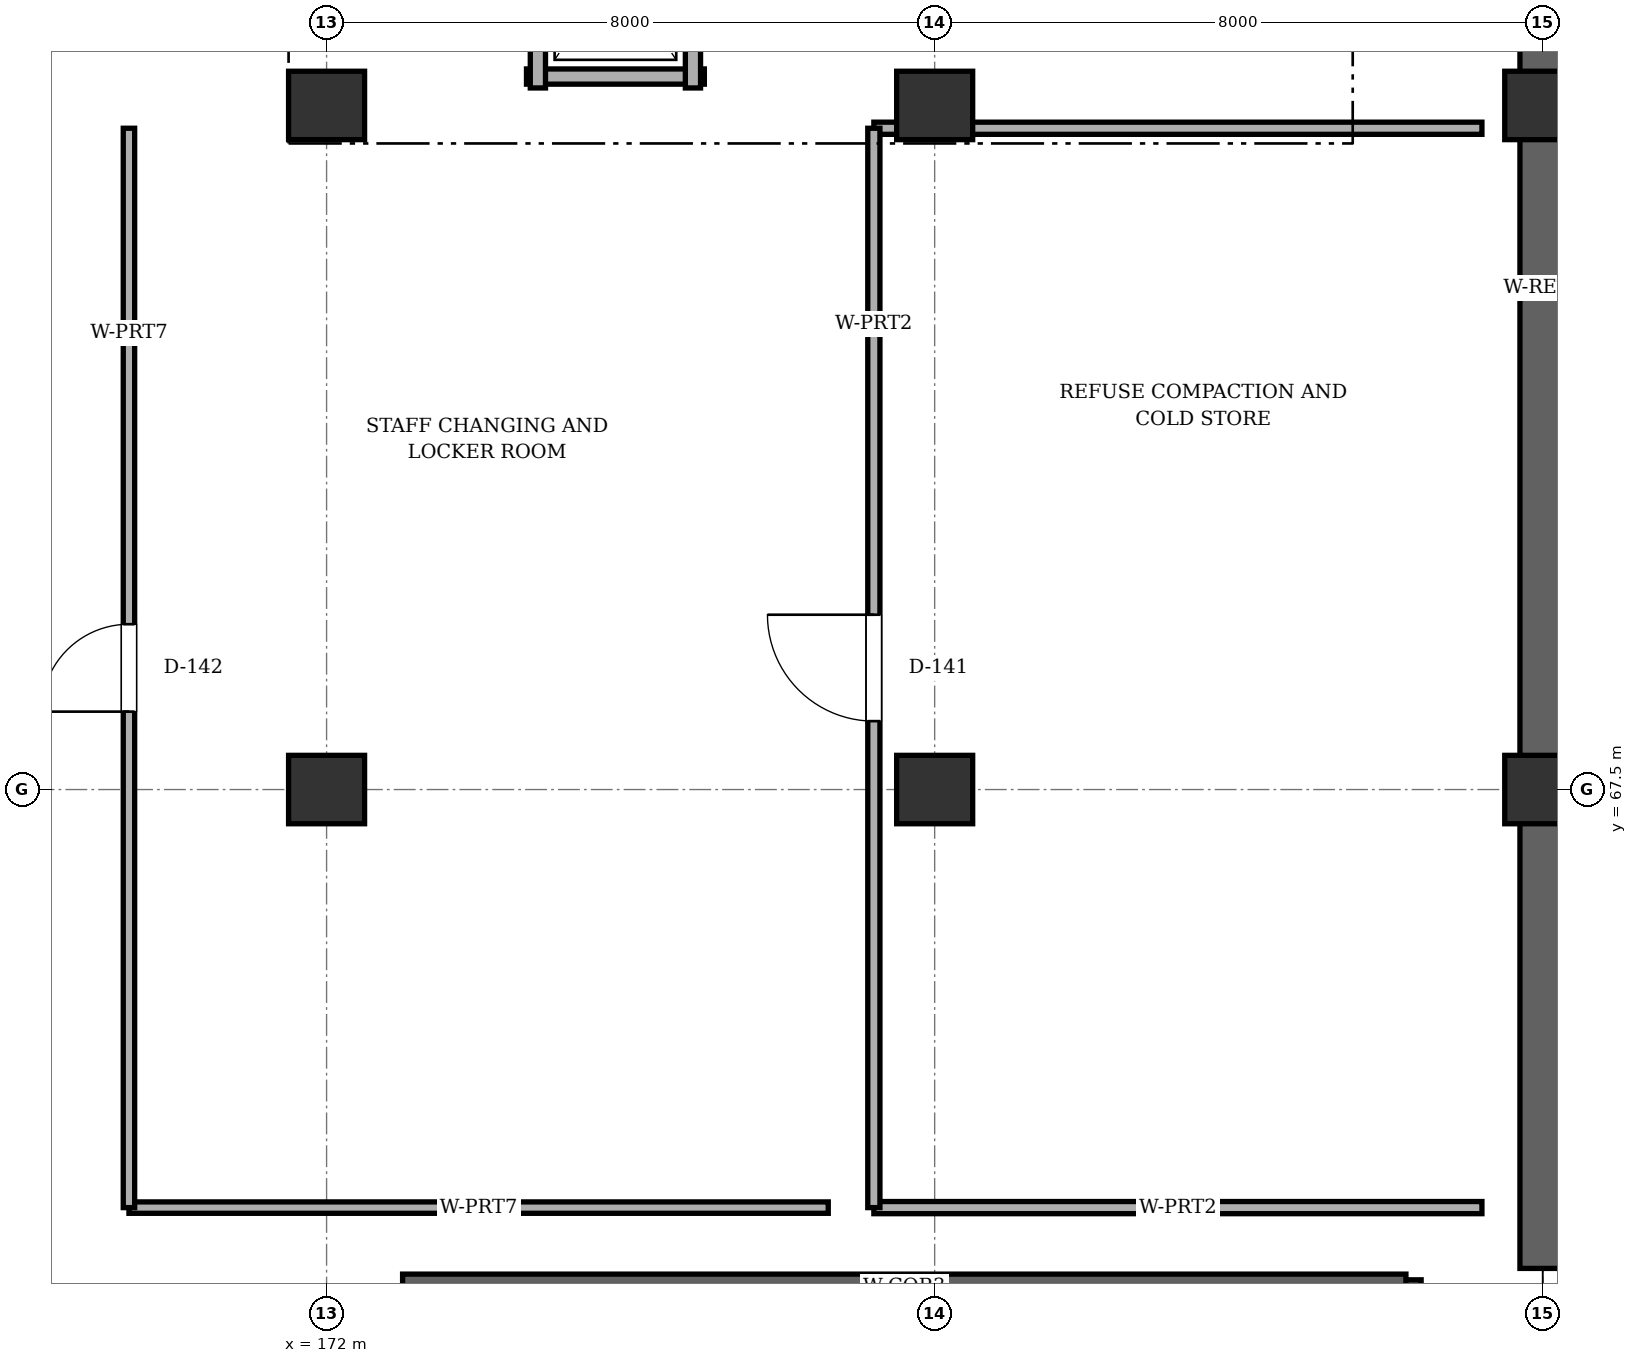
"""IFC4 building model, lengths in metres.
Left out: names, types, materials, properties, quantities, classifications, styles, units other than length and angle.
Written with IfcOpenShell. Run it as: python <this file> out.ifc"""

import sys

from ifc_helpers import new_model, si_unit, direction, frame, frame_2d, origin, origin_2d, place, context, subcontext, project, spatial, rectangle, extrude, element, fill, save


model = new_model("IFC4")
c1 = context("Model", 3, precision=1e-05, world=origin(), true_north=direction((0.0, 1.0)))
c2 = subcontext(c1, "Body", "Model", "MODEL_VIEW")
j1 = project(units=[si_unit("LENGTHUNIT", "METRE"), si_unit("PLANEANGLEUNIT", "RADIAN")], contexts=[c1])
p1 = place(None, origin())
s1 = spatial("IfcSite", under=j1, at=p1, CompositionType="ELEMENT")
p2 = place(p1, origin())
s2 = spatial("IfcBuilding", under=s1, at=p2, CompositionType="ELEMENT")
p3 = place(p2, frame((0.0, 0.0, -5.4)))
s3 = spatial("IfcBuildingStorey", under=s2, at=p3, CompositionType="ELEMENT", Elevation=-5.4)
for number, where, z_axis, x_axis in (
    (1, (172.0, 67.5, 0.0), (0.0, 0.0, 1.0), (1.0, 0.0, 0.0)),
    (2, (172.0, 76.5, 0.0), (0.0, 0.0, 1.0), (1.0, 0.0, 0.0)),
    (3, (180.0, 67.5, 0.0), (0.0, 0.0, 1.0), (1.0, 0.0, 0.0)),
    (4, (180.0, 76.5, 0.0), (0.0, 0.0, 1.0), (1.0, 0.0, 0.0)),
    (5, (188.0, 67.5, 0.0), (0.0, 0.0, 1.0), (1.0, 0.0, 0.0)),
    (6, (188.0, 76.5, 0.0), (0.0, 0.0, 1.0), (1.0, 0.0, 0.0)),
):
    element("IfcColumn", number, at=place(p3, frame(where, z_axis=z_axis, x_axis=x_axis)), inside=s3, PredefinedType="COLUMN", context=c2, shape_type="SweptSolid", body=[
        extrude(rectangle(XDim=1.0, YDim=0.9, at=origin_2d()), origin(), (0.0, 0.0, 1.0), 5.4),
    ])
p4 = place(p3, frame((188.0, 61.2, 0.0), z_axis=(0.0, 0.0, 1.0), x_axis=(0.0, 1.0, 0.0)))
e7 = element("IfcWall", 7, at=p4, inside=s3, PredefinedType="USERDEFINED", context=c2, shape_type="SweptSolid", body=[
    extrude(rectangle(XDim=64.8, YDim=0.6, at=frame_2d((32.4, 0.0))), origin(), (0.0, 0.0, 1.0), 5.1),
])
p5 = place(p3, frame((186.2, 56.35, 0.0), z_axis=(0.0, 0.0, 1.0), x_axis=(0.0, 1.0, 0.0)))
e8 = element("IfcWall", 8, at=p5, inside=s3, PredefinedType="SHEAR", context=c2, shape_type="SweptSolid", body=[
    extrude(rectangle(XDim=4.7, YDim=0.4, at=frame_2d((2.35, 0.0))), origin(), (0.0, 0.0, 1.0), 5.1),
])
p6 = place(p3, frame((186.2, 60.95, 0.0), z_axis=(0.0, 0.0, 1.0), x_axis=(-1.0, 0.0, 0.0)))
e9 = element("IfcWall", 9, at=p6, inside=s3, PredefinedType="SHEAR", context=c2, shape_type="SweptSolid", body=[
    extrude(rectangle(XDim=13.2, YDim=0.35, at=frame_2d((6.6, 0.0))), origin(), (0.0, 0.0, 1.0), 6.62),
])
p7 = place(p3, frame((174.63, 76.88, 0.0), z_axis=(0.0, 0.0, 1.0), x_axis=(1.0, 0.0, 0.0)))
e10 = element("IfcWall", 10, at=p7, inside=s3, PredefinedType="SOLIDWALL", context=c2, shape_type="SweptSolid", body=[
    extrude(rectangle(XDim=2.34, YDim=0.2, at=frame_2d((1.17, 0.0))), origin(), (0.0, 0.0, 1.0), 4.4),
])
for number, where, z_axis, x_axis in (
    (11, (174.78, 79.87, 0.0), (0.0, 0.0, 1.0), (0.0, -1.0, 0.0)),
    (12, (176.82, 76.73, 0.0), (0.0, 0.0, 1.0), (0.0, 1.0, 0.0)),
):
    element("IfcWall", number, at=place(p3, frame(where, z_axis=z_axis, x_axis=x_axis)), inside=s3, PredefinedType="SOLIDWALL", context=c2, shape_type="SweptSolid", body=[
        extrude(rectangle(XDim=3.14, YDim=0.2, at=frame_2d((1.57, 0.0))), origin(), (0.0, 0.0, 1.0), 4.4),
    ])
for number, where, z_axis, x_axis in (
    (13, (187.2, 62.0, 0.0), (0.0, 0.0, 1.0), (-1.0, 0.0, 0.0)),
    (14, (179.2, 76.2, 0.0), (0.0, 0.0, 1.0), (1.0, 0.0, 0.0)),
):
    element("IfcWall", number, at=place(p3, frame(where, z_axis=z_axis, x_axis=x_axis)), inside=s3, PredefinedType="PARTITIONING", context=c2, shape_type="SweptSolid", body=[
        extrude(rectangle(XDim=8.0, YDim=0.16, at=frame_2d((4.0, 0.0))), origin(), (0.0, 0.0, 1.0), 4.4),
    ])
p8 = place(p3, frame((179.2, 62.0, 0.0), z_axis=(0.0, 0.0, 1.0), x_axis=(0.0, 1.0, 0.0)))
e15 = element("IfcWall", 15, at=p8, inside=s3, PredefinedType="PARTITIONING", context=c2, shape_type="SweptSolid", body=[
    extrude(rectangle(XDim=14.2, YDim=0.16, at=frame_2d((7.1, 0.0))), origin(), (0.0, 0.0, 1.0), 4.4),
])
p9 = place(p8, frame((6.4, 0.0, 0.0)))
e16 = element("IfcOpeningElement", 16, at=p9, cuts=e15, PredefinedType="OPENING", context=c2, shape_type="SweptSolid", body=[
    extrude(rectangle(XDim=1.4, YDim=2.1, at=frame_2d((0.7, 1.05))), frame((0.0, 0.09, 0.0), z_axis=(0.0, -1.0, 0.0), x_axis=(1.0, 0.0, 0.0)), (0.0, 0.0, 1.0), 0.18),
])
p10 = place(p3, frame((178.6, 62.0, 0.0), z_axis=(0.0, 0.0, 1.0), x_axis=(-1.0, 0.0, 0.0)))
e17 = element("IfcWall", 17, at=p10, inside=s3, PredefinedType="PARTITIONING", context=c2, shape_type="SweptSolid", body=[
    extrude(rectangle(XDim=9.2, YDim=0.15, at=frame_2d((4.6, 0.0))), origin(), (0.0, 0.0, 1.0), 4.4),
])
p11 = place(p3, frame((169.4, 62.0, 0.0), z_axis=(0.0, 0.0, 1.0), x_axis=(0.0, 1.0, 0.0)))
e18 = element("IfcWall", 18, at=p11, inside=s3, PredefinedType="PARTITIONING", context=c2, shape_type="SweptSolid", body=[
    extrude(rectangle(XDim=14.2, YDim=0.15, at=frame_2d((7.1, 0.0))), origin(), (0.0, 0.0, 1.0), 4.4),
])
p12 = place(p11, frame((6.525, 0.0, 0.0)))
e19 = element("IfcOpeningElement", 19, at=p12, cuts=e18, PredefinedType="OPENING", context=c2, shape_type="SweptSolid", body=[
    extrude(rectangle(XDim=1.15, YDim=2.1, at=frame_2d((0.575, 1.05))), frame((0.0, 0.085, 0.0), z_axis=(0.0, -1.0, 0.0), x_axis=(1.0, 0.0, 0.0)), (0.0, 0.0, 1.0), 0.17),
])
p13 = place(p9, origin())
e20 = element("IfcDoor", 20, at=p13, inside=s3, OperationType="SINGLE_SWING_RIGHT", PredefinedType="DOOR", context=c2, shape_type="SweptSolid", body=[
    extrude(rectangle(XDim=1.4, YDim=2.1, at=frame_2d((0.7, 1.05))), frame((0.0, 0.025, 0.0), z_axis=(0.0, -1.0, 0.0), x_axis=(1.0, 0.0, 0.0)), (0.0, 0.0, 1.0), 0.05),
])
fill(e16, e20)
p14 = place(p12, origin())
e21 = element("IfcDoor", 21, at=p14, inside=s3, OperationType="SINGLE_SWING_LEFT", PredefinedType="DOOR", context=c2, shape_type="SweptSolid", body=[
    extrude(rectangle(XDim=1.15, YDim=2.1, at=frame_2d((0.575, 1.05))), frame((0.0, 0.025, 0.0), z_axis=(0.0, -1.0, 0.0), x_axis=(1.0, 0.0, 0.0)), (0.0, 0.0, 1.0), 0.05),
])
fill(e19, e21)
save(model, sys.argv[1])
